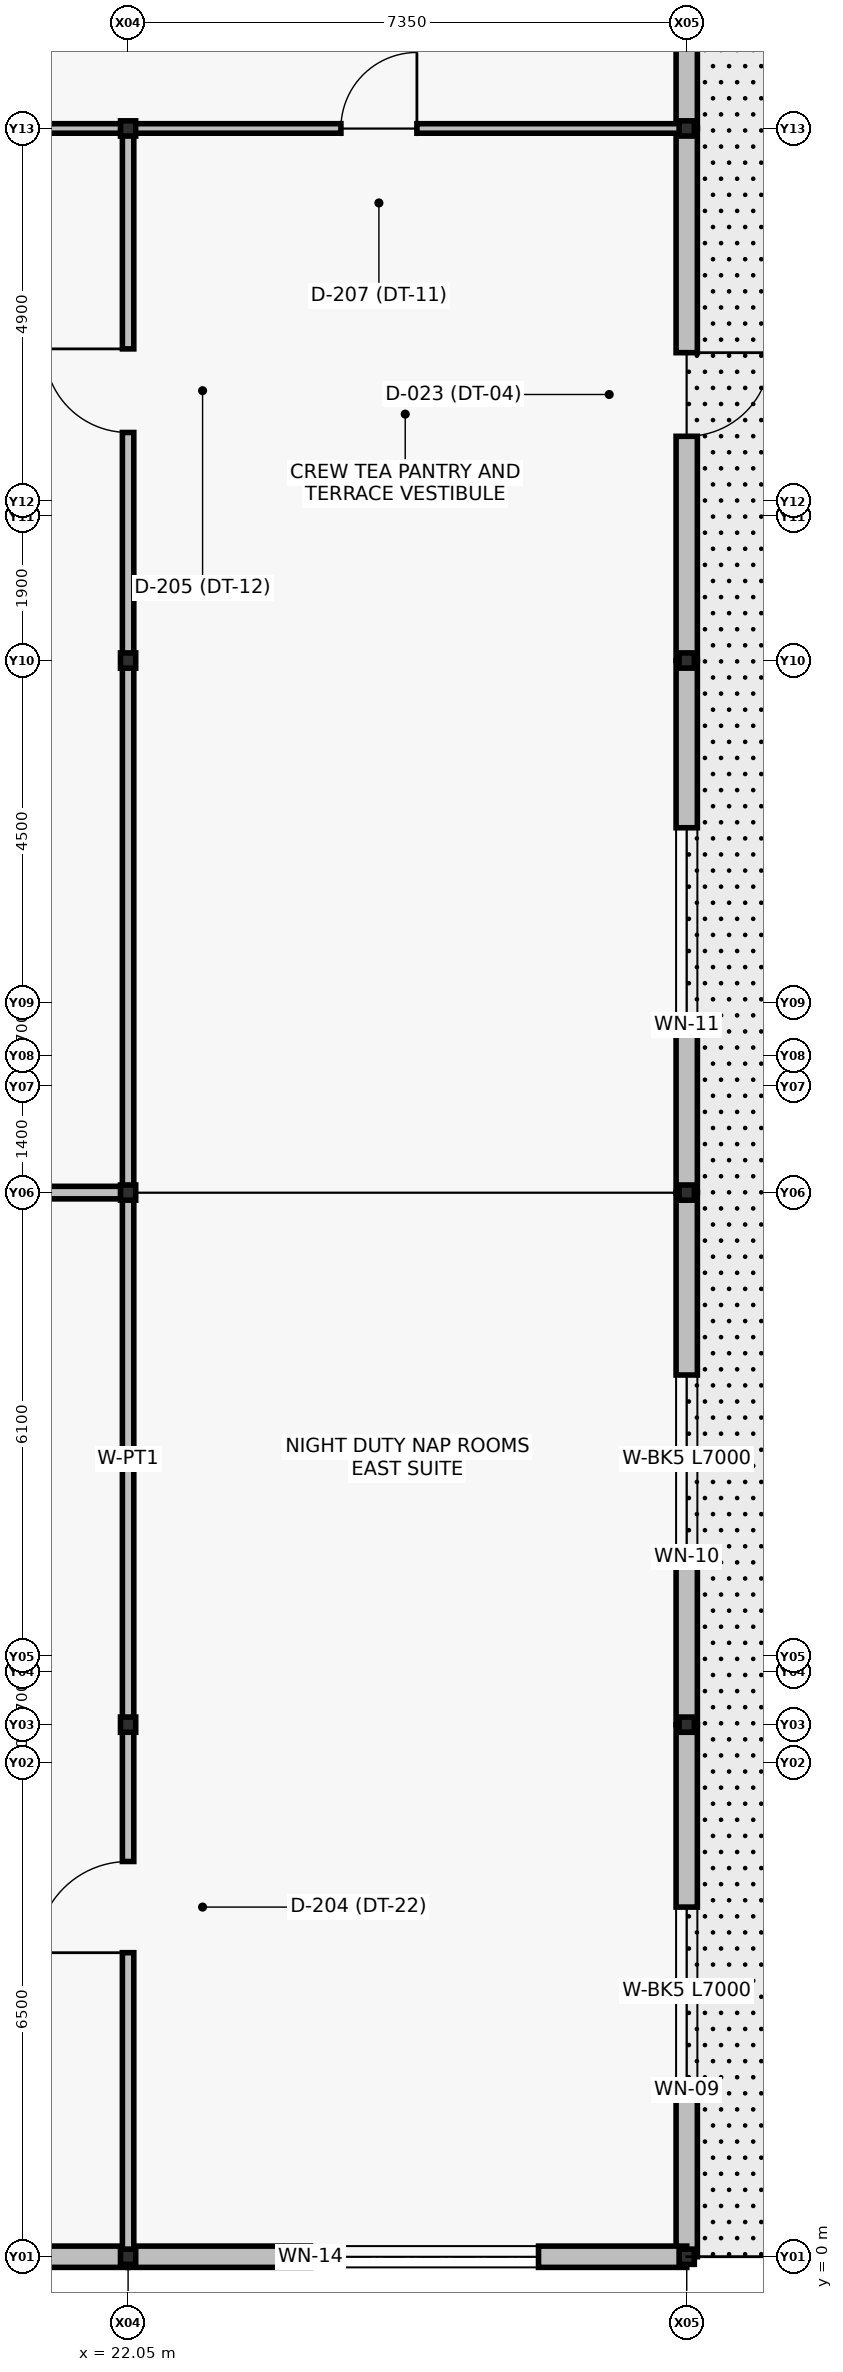
"""IFC4 building model, lengths in metres.
Left out: names, types, materials, properties, quantities, classifications, styles, units other than length and angle.
Written with IfcOpenShell. Run it as: python <this file> out.ifc"""

import sys

from ifc_helpers import new_model, si_unit, direction, frame, frame_2d, origin, origin_2d, place, context, subcontext, project, spatial, rectangle, i_section, extrude, element, fill, save


model = new_model("IFC4")
c1 = context("Model", 3, precision=1e-05, world=origin(), true_north=direction((0.0, 1.0)))
c2 = subcontext(c1, "Body", "Model", "MODEL_VIEW")
j1 = project(units=[si_unit("LENGTHUNIT", "METRE"), si_unit("PLANEANGLEUNIT", "RADIAN")], contexts=[c1])
p1 = place(None, origin())
s1 = spatial("IfcSite", under=j1, at=p1, CompositionType="ELEMENT")
p2 = place(p1, origin())
s2 = spatial("IfcBuilding", under=s1, at=p2, CompositionType="ELEMENT")
p3 = place(p2, frame((0.0, 0.0, 19.5)))
s3 = spatial("IfcBuildingStorey", under=s2, at=p3, CompositionType="ELEMENT", Elevation=19.5)
for number, where, z_axis, x_axis in (
    (1, (22.05, 0.0, 0.0), (0.0, 0.0, 1.0), (1.0, 0.0, 0.0)),
    (2, (22.05, 7.0, 0.0), (0.0, 0.0, 1.0), (1.0, 0.0, 0.0)),
    (3, (22.05, 14.0, 0.0), (0.0, 0.0, 1.0), (1.0, 0.0, 0.0)),
    (4, (22.05, 21.0, 0.0), (0.0, 0.0, 1.0), (1.0, 0.0, 0.0)),
    (5, (22.05, 28.0, 0.0), (0.0, 0.0, 1.0), (1.0, 0.0, 0.0)),
    (6, (29.4, 0.0, 0.0), (0.0, 0.0, 1.0), (1.0, 0.0, 0.0)),
    (7, (29.4, 7.0, 0.0), (0.0, 0.0, 1.0), (1.0, 0.0, 0.0)),
    (8, (29.4, 14.0, 0.0), (0.0, 0.0, 1.0), (1.0, 0.0, 0.0)),
    (9, (29.4, 21.0, 0.0), (0.0, 0.0, 1.0), (1.0, 0.0, 0.0)),
    (10, (29.4, 28.0, 0.0), (0.0, 0.0, 1.0), (1.0, 0.0, 0.0)),
):
    element("IfcColumn", number, at=place(p3, frame(where, z_axis=z_axis, x_axis=x_axis)), inside=s3, PredefinedType="COLUMN", context=c2, shape_type="SweptSolid", body=[
        extrude(i_section(OverallWidth=0.2, OverallDepth=0.2, WebThickness=0.008, FlangeThickness=0.012, at=origin_2d()), origin(), (0.0, 0.0, 1.0), 4.2),
    ])
p4 = place(p3, frame((29.4, 0.0, 0.0), z_axis=(0.0, 0.0, 1.0), x_axis=(0.0, 1.0, 0.0)))
e11 = element("IfcWall", 11, at=p4, inside=s3, PredefinedType="SOLIDWALL", context=c2, shape_type="SweptSolid", body=[
    extrude(rectangle(XDim=7.0, YDim=0.28, at=frame_2d((3.5, 0.0))), origin(), (0.0, 0.0, 1.0), 3.48),
])
p5 = place(p4, frame((2.2, 0.0, 0.9)))
e12 = element("IfcOpeningElement", 12, at=p5, cuts=e11, PredefinedType="OPENING", context=c2, shape_type="SweptSolid", body=[
    extrude(rectangle(XDim=2.4, YDim=1.8, at=frame_2d((1.2, 0.9))), frame((0.0, 0.15, 0.0), z_axis=(0.0, -1.0, 0.0), x_axis=(1.0, 0.0, 0.0)), (0.0, 0.0, 1.0), 0.3),
])
p6 = place(p3, frame((29.4, 7.0, 0.0), z_axis=(0.0, 0.0, 1.0), x_axis=(0.0, 1.0, 0.0)))
e13 = element("IfcWall", 13, at=p6, inside=s3, PredefinedType="SOLIDWALL", context=c2, shape_type="SweptSolid", body=[
    extrude(rectangle(XDim=7.0, YDim=0.28, at=frame_2d((3.5, 0.0))), origin(), (0.0, 0.0, 1.0), 3.48),
])
p7 = place(p6, frame((2.2, 0.0, 0.9)))
e14 = element("IfcOpeningElement", 14, at=p7, cuts=e13, PredefinedType="OPENING", context=c2, shape_type="SweptSolid", body=[
    extrude(rectangle(XDim=2.4, YDim=2.1, at=frame_2d((1.2, 1.05))), frame((0.0, 0.15, 0.0), z_axis=(0.0, -1.0, 0.0), x_axis=(1.0, 0.0, 0.0)), (0.0, 0.0, 1.0), 0.3),
])
p8 = place(p3, frame((29.4, 14.0, 0.0), z_axis=(0.0, 0.0, 1.0), x_axis=(0.0, 1.0, 0.0)))
e15 = element("IfcWall", 15, at=p8, inside=s3, PredefinedType="SOLIDWALL", context=c2, shape_type="SweptSolid", body=[
    extrude(rectangle(XDim=7.0, YDim=0.28, at=frame_2d((3.5, 0.0))), origin(), (0.0, 0.0, 1.0), 3.48),
])
p9 = place(p8, frame((2.2, 0.0, 0.9)))
e16 = element("IfcOpeningElement", 16, at=p9, cuts=e15, PredefinedType="OPENING", context=c2, shape_type="SweptSolid", body=[
    extrude(rectangle(XDim=2.6, YDim=2.0, at=frame_2d((1.3, 1.0))), frame((0.0, 0.15, 0.0), z_axis=(0.0, -1.0, 0.0), x_axis=(1.0, 0.0, 0.0)), (0.0, 0.0, 1.0), 0.3),
])
p10 = place(p3, frame((29.4, 21.0, 0.0), z_axis=(0.0, 0.0, 1.0), x_axis=(0.0, 1.0, 0.0)))
e17 = element("IfcWall", 17, at=p10, inside=s3, PredefinedType="SOLIDWALL", context=c2, shape_type="SweptSolid", body=[
    extrude(rectangle(XDim=7.0, YDim=0.28, at=frame_2d((3.5, 0.0))), origin(), (0.0, 0.0, 1.0), 3.48),
])
p11 = place(p10, frame((2.95, 0.0, 0.0)))
e18 = element("IfcOpeningElement", 18, at=p11, cuts=e17, PredefinedType="OPENING", context=c2, shape_type="SweptSolid", body=[
    extrude(rectangle(XDim=1.1, YDim=2.2, at=frame_2d((0.55, 1.1))), frame((0.0, 0.15, 0.0), z_axis=(0.0, -1.0, 0.0), x_axis=(1.0, 0.0, 0.0)), (0.0, 0.0, 1.0), 0.3),
])
p12 = place(p3, frame((29.4, 28.0, 0.0), z_axis=(0.0, 0.0, 1.0), x_axis=(0.0, 1.0, 0.0)))
e19 = element("IfcWall", 19, at=p12, inside=s3, PredefinedType="SOLIDWALL", context=c2, shape_type="SweptSolid", body=[
    extrude(rectangle(XDim=7.0, YDim=0.28, at=frame_2d((3.5, 0.0))), origin(), (0.0, 0.0, 1.0), 3.48),
])
p13 = place(p12, frame((2.2, 0.0, 0.9)))
e20 = element("IfcOpeningElement", 20, at=p13, cuts=e19, PredefinedType="OPENING", context=c2, shape_type="SweptSolid", body=[
    extrude(rectangle(XDim=3.0, YDim=1.8, at=frame_2d((1.5, 0.9))), frame((0.0, 0.15, 0.0), z_axis=(0.0, -1.0, 0.0), x_axis=(1.0, 0.0, 0.0)), (0.0, 0.0, 1.0), 0.3),
])
p14 = place(p3, frame((14.7, 0.0, 0.0), z_axis=(0.0, 0.0, 1.0), x_axis=(1.0, 0.0, 0.0)))
e21 = element("IfcWall", 21, at=p14, inside=s3, PredefinedType="SOLIDWALL", context=c2, shape_type="SweptSolid", body=[
    extrude(rectangle(XDim=7.35, YDim=0.28, at=frame_2d((3.675, 0.0))), origin(), (0.0, 0.0, 1.0), 3.48),
])
p15 = place(p14, frame((2.4, 0.0, 0.9)))
e22 = element("IfcOpeningElement", 22, at=p15, cuts=e21, PredefinedType="OPENING", context=c2, shape_type="SweptSolid", body=[
    extrude(rectangle(XDim=3.0, YDim=1.8, at=frame_2d((1.5, 0.9))), frame((0.0, 0.15, 0.0), z_axis=(0.0, -1.0, 0.0), x_axis=(1.0, 0.0, 0.0)), (0.0, 0.0, 1.0), 0.3),
])
p16 = place(p3, frame((22.05, 0.0, 0.0), z_axis=(0.0, 0.0, 1.0), x_axis=(1.0, 0.0, 0.0)))
e23 = element("IfcWall", 23, at=p16, inside=s3, PredefinedType="SOLIDWALL", context=c2, shape_type="SweptSolid", body=[
    extrude(rectangle(XDim=7.35, YDim=0.28, at=frame_2d((3.675, 0.0))), origin(), (0.0, 0.0, 1.0), 3.48),
])
p17 = place(p16, frame((2.4, 0.0, 0.9)))
e24 = element("IfcOpeningElement", 24, at=p17, cuts=e23, PredefinedType="OPENING", context=c2, shape_type="SweptSolid", body=[
    extrude(rectangle(XDim=3.0, YDim=2.2, at=frame_2d((1.5, 1.1))), frame((0.0, 0.15, 0.0), z_axis=(0.0, -1.0, 0.0), x_axis=(1.0, 0.0, 0.0)), (0.0, 0.0, 1.0), 0.3),
])
p18 = place(p3, frame((7.35, 14.0, 0.0), z_axis=(0.0, 0.0, 1.0), x_axis=(1.0, 0.0, 0.0)))
e25 = element("IfcWall", 25, at=p18, inside=s3, PredefinedType="PARTITIONING", context=c2, shape_type="SweptSolid", body=[
    extrude(rectangle(XDim=14.7, YDim=0.165, at=frame_2d((7.35, 0.0))), origin(), (0.0, 0.0, 1.0), 3.25),
])
p19 = place(p18, frame((4.0, 0.0, 0.0)))
e26 = element("IfcOpeningElement", 26, at=p19, cuts=e25, PredefinedType="OPENING", context=c2, shape_type="SweptSolid", body=[
    extrude(rectangle(XDim=1.05, YDim=2.1, at=frame_2d((0.525, 1.05))), frame((0.0, 0.092, 0.0), z_axis=(0.0, -1.0, 0.0), x_axis=(1.0, 0.0, 0.0)), (0.0, 0.0, 1.0), 0.185),
])
p20 = place(p3, frame((22.05, 0.0, 0.0), z_axis=(0.0, 0.0, 1.0), x_axis=(0.0, 1.0, 0.0)))
e27 = element("IfcWall", 27, at=p20, inside=s3, PredefinedType="PARTITIONING", context=c2, shape_type="SweptSolid", body=[
    extrude(rectangle(XDim=28.0, YDim=0.15, at=frame_2d((14.0, 0.0))), origin(), (0.0, 0.0, 1.0), 3.25),
])
p21 = place(p20, frame((4.0, 0.0, 0.0)))
e28 = element("IfcOpeningElement", 28, at=p21, cuts=e27, PredefinedType="OPENING", context=c2, shape_type="SweptSolid", body=[
    extrude(rectangle(XDim=1.2, YDim=2.1, at=frame_2d((0.6, 1.05))), frame((0.0, 0.085, 0.0), z_axis=(0.0, -1.0, 0.0), x_axis=(1.0, 0.0, 0.0)), (0.0, 0.0, 1.0), 0.17),
])
p22 = place(p20, frame((24.0, 0.0, 0.0)))
e29 = element("IfcOpeningElement", 29, at=p22, cuts=e27, PredefinedType="OPENING", context=c2, shape_type="SweptSolid", body=[
    extrude(rectangle(XDim=1.1, YDim=2.1, at=frame_2d((0.55, 1.05))), frame((0.0, 0.085, 0.0), z_axis=(0.0, -1.0, 0.0), x_axis=(1.0, 0.0, 0.0)), (0.0, 0.0, 1.0), 0.17),
])
p23 = place(p3, frame((7.35, 28.0, 0.0), z_axis=(0.0, 0.0, 1.0), x_axis=(1.0, 0.0, 0.0)))
e30 = element("IfcWall", 30, at=p23, inside=s3, PredefinedType="PARTITIONING", context=c2, shape_type="SweptSolid", body=[
    extrude(rectangle(XDim=22.05, YDim=0.125, at=frame_2d((11.025, 0.0))), origin(), (0.0, 0.0, 1.0), 3.25),
])
p24 = place(p23, frame((4.0, 0.0, 0.0)))
e31 = element("IfcOpeningElement", 31, at=p24, cuts=e30, PredefinedType="OPENING", context=c2, shape_type="SweptSolid", body=[
    extrude(rectangle(XDim=1.35, YDim=2.2, at=frame_2d((0.675, 1.1))), frame((0.0, 0.072, 0.0), z_axis=(0.0, -1.0, 0.0), x_axis=(1.0, 0.0, 0.0)), (0.0, 0.0, 1.0), 0.145),
])
p25 = place(p23, frame((17.5, 0.0, 0.0)))
e32 = element("IfcOpeningElement", 32, at=p25, cuts=e30, PredefinedType="OPENING", context=c2, shape_type="SweptSolid", body=[
    extrude(rectangle(XDim=1.0, YDim=2.2, at=frame_2d((0.5, 1.1))), frame((0.0, 0.072, 0.0), z_axis=(0.0, -1.0, 0.0), x_axis=(1.0, 0.0, 0.0)), (0.0, 0.0, 1.0), 0.145),
])
p26 = place(p5, origin())
e33 = element("IfcWindow", 33, at=p26, inside=s3, PartitioningType="SINGLE_PANEL", PredefinedType="WINDOW", context=c2, shape_type="SweptSolid", body=[
    extrude(rectangle(XDim=2.4, YDim=1.8, at=frame_2d((1.2, 0.9))), frame((0.0, 0.03, 0.0), z_axis=(0.0, -1.0, 0.0), x_axis=(1.0, 0.0, 0.0)), (0.0, 0.0, 1.0), 0.06),
])
fill(e12, e33)
p27 = place(p7, origin())
e34 = element("IfcWindow", 34, at=p27, inside=s3, PartitioningType="SINGLE_PANEL", PredefinedType="WINDOW", context=c2, shape_type="SweptSolid", body=[
    extrude(rectangle(XDim=2.4, YDim=2.1, at=frame_2d((1.2, 1.05))), frame((0.0, 0.03, 0.0), z_axis=(0.0, -1.0, 0.0), x_axis=(1.0, 0.0, 0.0)), (0.0, 0.0, 1.0), 0.06),
])
fill(e14, e34)
p28 = place(p9, origin())
e35 = element("IfcWindow", 35, at=p28, inside=s3, PartitioningType="SINGLE_PANEL", PredefinedType="WINDOW", context=c2, shape_type="SweptSolid", body=[
    extrude(rectangle(XDim=2.6, YDim=2.0, at=frame_2d((1.3, 1.0))), frame((0.0, 0.03, 0.0), z_axis=(0.0, -1.0, 0.0), x_axis=(1.0, 0.0, 0.0)), (0.0, 0.0, 1.0), 0.06),
])
fill(e16, e35)
p29 = place(p11, frame((1.1, 0.0, 0.0), z_axis=(0.0, 0.0, 1.0), x_axis=(-1.0, 0.0, 0.0)))
e36 = element("IfcDoor", 36, at=p29, inside=s3, OperationType="SINGLE_SWING_RIGHT", PredefinedType="DOOR", context=c2, shape_type="SweptSolid", body=[
    extrude(rectangle(XDim=1.1, YDim=2.2, at=frame_2d((0.55, 1.1))), frame((0.0, 0.025, 0.0), z_axis=(0.0, -1.0, 0.0), x_axis=(1.0, 0.0, 0.0)), (0.0, 0.0, 1.0), 0.05),
])
fill(e18, e36)
p30 = place(p17, origin())
e37 = element("IfcWindow", 37, at=p30, inside=s3, PartitioningType="SINGLE_PANEL", PredefinedType="WINDOW", context=c2, shape_type="SweptSolid", body=[
    extrude(rectangle(XDim=3.0, YDim=2.2, at=frame_2d((1.5, 1.1))), frame((0.0, 0.03, 0.0), z_axis=(0.0, -1.0, 0.0), x_axis=(1.0, 0.0, 0.0)), (0.0, 0.0, 1.0), 0.06),
])
fill(e24, e37)
p31 = place(p21, origin())
e38 = element("IfcDoor", 38, at=p31, inside=s3, OperationType="SINGLE_SWING_LEFT", PredefinedType="DOOR", context=c2, shape_type="SweptSolid", body=[
    extrude(rectangle(XDim=1.2, YDim=2.1, at=frame_2d((0.6, 1.05))), frame((0.0, 0.025, 0.0), z_axis=(0.0, -1.0, 0.0), x_axis=(1.0, 0.0, 0.0)), (0.0, 0.0, 1.0), 0.05),
])
fill(e28, e38)
p32 = place(p22, origin())
e39 = element("IfcDoor", 39, at=p32, inside=s3, OperationType="SINGLE_SWING_RIGHT", PredefinedType="DOOR", context=c2, shape_type="SweptSolid", body=[
    extrude(rectangle(XDim=1.1, YDim=2.1, at=frame_2d((0.55, 1.05))), frame((0.0, 0.025, 0.0), z_axis=(0.0, -1.0, 0.0), x_axis=(1.0, 0.0, 0.0)), (0.0, 0.0, 1.0), 0.05),
])
fill(e29, e39)
p33 = place(p25, origin())
e40 = element("IfcDoor", 40, at=p33, inside=s3, OperationType="SINGLE_SWING_RIGHT", PredefinedType="DOOR", context=c2, shape_type="SweptSolid", body=[
    extrude(rectangle(XDim=1.0, YDim=2.2, at=frame_2d((0.5, 1.1))), frame((0.0, 0.025, 0.0), z_axis=(0.0, -1.0, 0.0), x_axis=(1.0, 0.0, 0.0)), (0.0, 0.0, 1.0), 0.05),
])
fill(e32, e40)
save(model, sys.argv[1])
